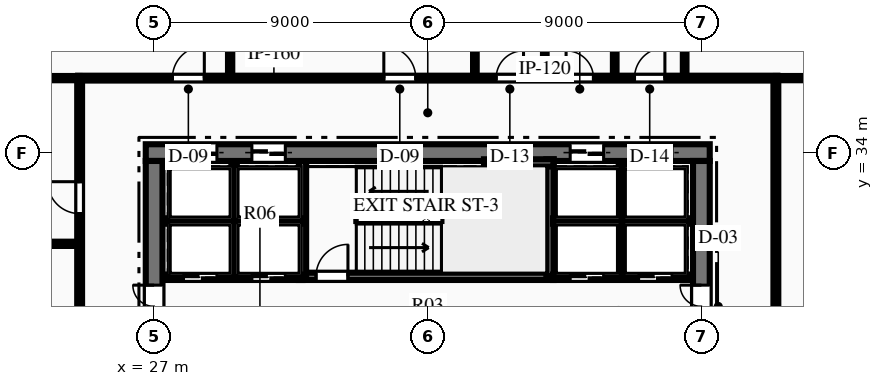
"""IFC4 building model, lengths in metres.
Left out: names, types, materials, properties, quantities, classifications, styles, units other than length and angle.
Written with IfcOpenShell. Run it as: python <this file> out.ifc"""

import sys

from ifc_helpers import new_model, si_unit, direction, frame, frame_2d, origin, place, context, subcontext, project, spatial, rectangle, extrude, element, fill, save


model = new_model("IFC4")
c1 = context("Model", 3, precision=1e-05, world=origin(), true_north=direction((0.0, 1.0)))
c2 = subcontext(c1, "Body", "Model", "MODEL_VIEW")
j1 = project(units=[si_unit("LENGTHUNIT", "METRE"), si_unit("PLANEANGLEUNIT", "RADIAN")], contexts=[c1])
p1 = place(None, origin())
s1 = spatial("IfcSite", under=j1, at=p1, CompositionType="ELEMENT")
p2 = place(p1, origin())
s2 = spatial("IfcBuilding", under=s1, at=p2, CompositionType="ELEMENT")
p3 = place(p2, frame((0.0, 0.0, 97.95)))
s3 = spatial("IfcBuildingStorey", under=s2, at=p3, CompositionType="ELEMENT", Elevation=97.95)
p4 = place(p3, frame((26.725, 34.0, 0.0), z_axis=(0.0, 0.0, 1.0), x_axis=(1.0, 0.0, 0.0)))
e1 = element("IfcWall", 1, at=p4, inside=s3, PredefinedType="SHEAR", context=c2, shape_type="SweptSolid", body=[
    extrude(rectangle(XDim=18.55, YDim=0.55, at=frame_2d((9.275, 0.0))), origin(), (0.0, 0.0, 1.0), 3.75),
])
p5 = place(p4, frame((1.24, 0.0, 0.0)))
e2 = element("IfcOpeningElement", 2, at=p5, cuts=e1, PredefinedType="OPENING", context=c2, shape_type="SweptSolid", body=[
    extrude(rectangle(XDim=1.1, YDim=2.15, at=frame_2d((0.55, 1.075))), frame((0.0, 0.285, 0.0), z_axis=(0.0, -1.0, 0.0), x_axis=(1.0, 0.0, 0.0)), (0.0, 0.0, 1.0), 0.57),
])
p6 = place(p4, frame((3.49, 0.0, 0.0)))
e3 = element("IfcOpeningElement", 3, at=p6, cuts=e1, PredefinedType="OPENING", context=c2, shape_type="SweptSolid", body=[
    extrude(rectangle(XDim=1.1, YDim=2.15, at=frame_2d((0.55, 1.075))), frame((0.0, 0.285, 0.0), z_axis=(0.0, -1.0, 0.0), x_axis=(1.0, 0.0, 0.0)), (0.0, 0.0, 1.0), 0.57),
])
p7 = place(p4, frame((13.96, 0.0, 0.0)))
e4 = element("IfcOpeningElement", 4, at=p7, cuts=e1, PredefinedType="OPENING", context=c2, shape_type="SweptSolid", body=[
    extrude(rectangle(XDim=1.1, YDim=2.15, at=frame_2d((0.55, 1.075))), frame((0.0, 0.285, 0.0), z_axis=(0.0, -1.0, 0.0), x_axis=(1.0, 0.0, 0.0)), (0.0, 0.0, 1.0), 0.57),
])
p8 = place(p4, frame((16.21, 0.0, 0.0)))
e5 = element("IfcOpeningElement", 5, at=p8, cuts=e1, PredefinedType="OPENING", context=c2, shape_type="SweptSolid", body=[
    extrude(rectangle(XDim=1.1, YDim=2.15, at=frame_2d((0.55, 1.075))), frame((0.0, 0.285, 0.0), z_axis=(0.0, -1.0, 0.0), x_axis=(1.0, 0.0, 0.0)), (0.0, 0.0, 1.0), 0.57),
])
p9 = place(p3, frame((27.0, 18.275, 0.0), z_axis=(0.0, 0.0, 1.0), x_axis=(0.0, 1.0, 0.0)))
e6 = element("IfcWall", 6, at=p9, inside=s3, PredefinedType="SHEAR", context=c2, shape_type="SweptSolid", body=[
    extrude(rectangle(XDim=15.45, YDim=0.55, at=frame_2d((7.725, 0.0))), origin(), (0.0, 0.0, 1.0), 3.75),
])
p10 = place(p9, frame((9.965, 0.0, 0.0)))
e7 = element("IfcOpeningElement", 7, at=p10, cuts=e6, PredefinedType="OPENING", context=c2, shape_type="SweptSolid", body=[
    extrude(rectangle(XDim=1.4, YDim=2.2, at=frame_2d((0.7, 1.1))), frame((0.0, 0.285, 0.0), z_axis=(0.0, -1.0, 0.0), x_axis=(1.0, 0.0, 0.0)), (0.0, 0.0, 1.0), 0.57),
])
p11 = place(p3, frame((45.0, 18.275, 0.0), z_axis=(0.0, 0.0, 1.0), x_axis=(0.0, 1.0, 0.0)))
e8 = element("IfcWall", 8, at=p11, inside=s3, PredefinedType="SHEAR", context=c2, shape_type="SweptSolid", body=[
    extrude(rectangle(XDim=15.45, YDim=0.55, at=frame_2d((7.725, 0.0))), origin(), (0.0, 0.0, 1.0), 3.75),
])
p12 = place(p11, frame((9.965, 0.0, 0.0)))
e9 = element("IfcOpeningElement", 9, at=p12, cuts=e8, PredefinedType="OPENING", context=c2, shape_type="SweptSolid", body=[
    extrude(rectangle(XDim=1.4, YDim=2.2, at=frame_2d((0.7, 1.1))), frame((0.0, 0.285, 0.0), z_axis=(0.0, -1.0, 0.0), x_axis=(1.0, 0.0, 0.0)), (0.0, 0.0, 1.0), 0.57),
])
p13 = place(p3, frame((31.76, 29.93, 0.0), z_axis=(0.0, 0.0, 1.0), x_axis=(1.0, 0.0, 0.0)))
e10 = element("IfcWall", 10, at=p13, inside=s3, PredefinedType="SHEAR", context=c2, shape_type="SweptSolid", body=[
    extrude(rectangle(XDim=8.38, YDim=0.24, at=frame_2d((4.19, 0.0))), origin(), (0.0, 0.0, 1.0), 3.75),
])
p14 = place(p13, frame((0.565, 0.0, 0.0)))
e11 = element("IfcOpeningElement", 11, at=p14, cuts=e10, PredefinedType="OPENING", context=c2, shape_type="SweptSolid", body=[
    extrude(rectangle(XDim=1.05, YDim=2.15, at=frame_2d((0.525, 1.075))), frame((0.0, 0.13, 0.0), z_axis=(0.0, -1.0, 0.0), x_axis=(1.0, 0.0, 0.0)), (0.0, 0.0, 1.0), 0.26),
])
p15 = place(p3, frame((31.88, 29.93, 0.0), z_axis=(0.0, 0.0, 1.0), x_axis=(0.0, 1.0, 0.0)))
e12 = element("IfcWall", 12, at=p15, inside=s3, PredefinedType="SHEAR", context=c2, shape_type="SweptSolid", body=[
    extrude(rectangle(XDim=3.79, YDim=0.24, at=frame_2d((1.895, 0.0))), origin(), (0.0, 0.0, 1.0), 3.75),
])
p16 = place(p3, frame((40.02, 29.93, 0.0), z_axis=(0.0, 0.0, 1.0), x_axis=(0.0, 1.0, 0.0)))
e13 = element("IfcWall", 13, at=p16, inside=s3, PredefinedType="SHEAR", context=c2, shape_type="SweptSolid", body=[
    extrude(rectangle(XDim=3.85, YDim=0.24, at=frame_2d((1.925, 0.0))), origin(), (0.0, 0.0, 1.0), 3.75),
])
p17 = place(p3, frame((37.85, 33.66, 0.0), z_axis=(0.0, 0.0, 1.0), x_axis=(1.0, 0.0, 0.0)))
e14 = element("IfcWall", 14, at=p17, inside=s3, PredefinedType="SHEAR", context=c2, shape_type="SweptSolid", body=[
    extrude(rectangle(XDim=2.29, YDim=0.24, at=frame_2d((1.145, 0.0))), origin(), (0.0, 0.0, 1.0), 3.75),
])
p18 = place(p3, frame((27.45, 29.9, 0.0), z_axis=(0.0, 0.0, 1.0), x_axis=(1.0, 0.0, 0.0)))
e15 = element("IfcWall", 15, at=p18, inside=s3, PredefinedType="PARTITIONING", context=c2, shape_type="SweptSolid", body=[
    extrude(rectangle(XDim=4.43, YDim=0.18, at=frame_2d((2.215, 0.0))), origin(), (0.0, 0.0, 1.0), 3.45),
])
p19 = place(p18, frame((0.515, 0.0, 0.0)))
e16 = element("IfcOpeningElement", 16, at=p19, cuts=e15, PredefinedType="OPENING", context=c2, shape_type="SweptSolid", body=[
    extrude(rectangle(XDim=1.1, YDim=2.15, at=frame_2d((0.55, 1.075))), frame((0.0, 0.1, 0.0), z_axis=(0.0, -1.0, 0.0), x_axis=(1.0, 0.0, 0.0)), (0.0, 0.0, 1.0), 0.2),
])
p20 = place(p18, frame((2.765, 0.0, 0.0)))
e17 = element("IfcOpeningElement", 17, at=p20, cuts=e15, PredefinedType="OPENING", context=c2, shape_type="SweptSolid", body=[
    extrude(rectangle(XDim=1.1, YDim=2.15, at=frame_2d((0.55, 1.075))), frame((0.0, 0.1, 0.0), z_axis=(0.0, -1.0, 0.0), x_axis=(1.0, 0.0, 0.0)), (0.0, 0.0, 1.0), 0.2),
])
p21 = place(p3, frame((27.45, 31.75, 0.0), z_axis=(0.0, 0.0, 1.0), x_axis=(1.0, 0.0, 0.0)))
e18 = element("IfcWall", 18, at=p21, inside=s3, PredefinedType="PARTITIONING", context=c2, shape_type="SweptSolid", body=[
    extrude(rectangle(XDim=4.43, YDim=0.18, at=frame_2d((2.215, 0.0))), origin(), (0.0, 0.0, 1.0), 3.45),
])
p22 = place(p3, frame((29.63, 29.9, 0.0), z_axis=(0.0, 0.0, 1.0), x_axis=(0.0, 1.0, 0.0)))
e19 = element("IfcWall", 19, at=p22, inside=s3, PredefinedType="PARTITIONING", context=c2, shape_type="SweptSolid", body=[
    extrude(rectangle(XDim=3.75, YDim=0.18, at=frame_2d((1.875, 0.0))), origin(), (0.0, 0.0, 1.0), 3.45),
])
p23 = place(p3, frame((40.12, 29.9, 0.0), z_axis=(0.0, 0.0, 1.0), x_axis=(1.0, 0.0, 0.0)))
e20 = element("IfcWall", 20, at=p23, inside=s3, PredefinedType="PARTITIONING", context=c2, shape_type="SweptSolid", body=[
    extrude(rectangle(XDim=4.43, YDim=0.18, at=frame_2d((2.215, 0.0))), origin(), (0.0, 0.0, 1.0), 3.45),
])
p24 = place(p23, frame((0.565, 0.0, 0.0)))
e21 = element("IfcOpeningElement", 21, at=p24, cuts=e20, PredefinedType="OPENING", context=c2, shape_type="SweptSolid", body=[
    extrude(rectangle(XDim=1.1, YDim=2.15, at=frame_2d((0.55, 1.075))), frame((0.0, 0.1, 0.0), z_axis=(0.0, -1.0, 0.0), x_axis=(1.0, 0.0, 0.0)), (0.0, 0.0, 1.0), 0.2),
])
p25 = place(p23, frame((2.815, 0.0, 0.0)))
e22 = element("IfcOpeningElement", 22, at=p25, cuts=e20, PredefinedType="OPENING", context=c2, shape_type="SweptSolid", body=[
    extrude(rectangle(XDim=1.1, YDim=2.15, at=frame_2d((0.55, 1.075))), frame((0.0, 0.1, 0.0), z_axis=(0.0, -1.0, 0.0), x_axis=(1.0, 0.0, 0.0)), (0.0, 0.0, 1.0), 0.2),
])
p26 = place(p3, frame((40.12, 31.75, 0.0), z_axis=(0.0, 0.0, 1.0), x_axis=(1.0, 0.0, 0.0)))
e23 = element("IfcWall", 23, at=p26, inside=s3, PredefinedType="PARTITIONING", context=c2, shape_type="SweptSolid", body=[
    extrude(rectangle(XDim=4.43, YDim=0.18, at=frame_2d((2.215, 0.0))), origin(), (0.0, 0.0, 1.0), 3.45),
])
p27 = place(p3, frame((42.37, 29.9, 0.0), z_axis=(0.0, 0.0, 1.0), x_axis=(0.0, 1.0, 0.0)))
e24 = element("IfcWall", 24, at=p27, inside=s3, PredefinedType="PARTITIONING", context=c2, shape_type="SweptSolid", body=[
    extrude(rectangle(XDim=3.75, YDim=0.18, at=frame_2d((1.875, 0.0))), origin(), (0.0, 0.0, 1.0), 3.45),
])
p28 = place(p3, frame((24.5, 36.45, 0.0), z_axis=(0.0, 0.0, 1.0), x_axis=(1.0, 0.0, 0.0)))
e25 = element("IfcWall", 25, at=p28, inside=s3, PredefinedType="PARTITIONING", context=c2, shape_type="SweptSolid", body=[
    extrude(rectangle(XDim=23.0, YDim=0.16, at=frame_2d((11.5, 0.0))), origin(), (0.0, 0.0, 1.0), 3.45),
])
p29 = place(p28, frame((13.75, 0.0, 0.0)))
e26 = element("IfcOpeningElement", 26, at=p29, cuts=e25, PredefinedType="OPENING", context=c2, shape_type="SweptSolid", body=[
    extrude(rectangle(XDim=0.9, YDim=2.15, at=frame_2d((0.45, 1.075))), frame((0.0, 0.09, 0.0), z_axis=(0.0, -1.0, 0.0), x_axis=(1.0, 0.0, 0.0)), (0.0, 0.0, 1.0), 0.18),
])
p30 = place(p28, frame((16.05, 0.0, 0.0)))
e27 = element("IfcOpeningElement", 27, at=p30, cuts=e25, PredefinedType="OPENING", context=c2, shape_type="SweptSolid", body=[
    extrude(rectangle(XDim=0.9, YDim=2.15, at=frame_2d((0.45, 1.075))), frame((0.0, 0.09, 0.0), z_axis=(0.0, -1.0, 0.0), x_axis=(1.0, 0.0, 0.0)), (0.0, 0.0, 1.0), 0.18),
])
p31 = place(p28, frame((18.3, 0.0, 0.0)))
e28 = element("IfcOpeningElement", 28, at=p31, cuts=e25, PredefinedType="OPENING", context=c2, shape_type="SweptSolid", body=[
    extrude(rectangle(XDim=1.0, YDim=2.15, at=frame_2d((0.5, 1.075))), frame((0.0, 0.09, 0.0), z_axis=(0.0, -1.0, 0.0), x_axis=(1.0, 0.0, 0.0)), (0.0, 0.0, 1.0), 0.18),
])
p32 = place(p28, frame((3.101, 0.0, 0.0)))
e29 = element("IfcOpeningElement", 29, at=p32, cuts=e25, PredefinedType="OPENING", context=c2, shape_type="SweptSolid", body=[
    extrude(rectangle(XDim=1.05, YDim=2.15, at=frame_2d((0.525, 1.075))), frame((0.0, 0.09, 0.0), z_axis=(0.0, -1.0, 0.0), x_axis=(1.0, 0.0, 0.0)), (0.0, 0.0, 1.0), 0.18),
])
p33 = place(p28, frame((10.055, 0.0, 0.0)))
e30 = element("IfcOpeningElement", 30, at=p33, cuts=e25, PredefinedType="OPENING", context=c2, shape_type="SweptSolid", body=[
    extrude(rectangle(XDim=1.05, YDim=2.15, at=frame_2d((0.525, 1.075))), frame((0.0, 0.09, 0.0), z_axis=(0.0, -1.0, 0.0), x_axis=(1.0, 0.0, 0.0)), (0.0, 0.0, 1.0), 0.18),
])
p34 = place(p3, frame((24.55, 15.55, 0.0), z_axis=(0.0, 0.0, 1.0), x_axis=(0.0, 1.0, 0.0)))
e31 = element("IfcWall", 31, at=p34, inside=s3, PredefinedType="PARTITIONING", context=c2, shape_type="SweptSolid", body=[
    extrude(rectangle(XDim=20.9, YDim=0.16, at=frame_2d((10.45, 0.0))), origin(), (0.0, 0.0, 1.0), 3.45),
])
p35 = place(p34, frame((5.107, 0.0, 0.0)))
e32 = element("IfcOpeningElement", 32, at=p35, cuts=e31, PredefinedType="OPENING", context=c2, shape_type="SweptSolid", body=[
    extrude(rectangle(XDim=1.05, YDim=2.15, at=frame_2d((0.525, 1.075))), frame((0.0, 0.09, 0.0), z_axis=(0.0, -1.0, 0.0), x_axis=(1.0, 0.0, 0.0)), (0.0, 0.0, 1.0), 0.18),
])
p36 = place(p34, frame((12.155, 0.0, 0.0)))
e33 = element("IfcOpeningElement", 33, at=p36, cuts=e31, PredefinedType="OPENING", context=c2, shape_type="SweptSolid", body=[
    extrude(rectangle(XDim=1.05, YDim=2.15, at=frame_2d((0.525, 1.075))), frame((0.0, 0.09, 0.0), z_axis=(0.0, -1.0, 0.0), x_axis=(1.0, 0.0, 0.0)), (0.0, 0.0, 1.0), 0.18),
])
p37 = place(p34, frame((16.443, 0.0, 0.0)))
e34 = element("IfcOpeningElement", 34, at=p37, cuts=e31, PredefinedType="OPENING", context=c2, shape_type="SweptSolid", body=[
    extrude(rectangle(XDim=1.05, YDim=2.15, at=frame_2d((0.525, 1.075))), frame((0.0, 0.09, 0.0), z_axis=(0.0, -1.0, 0.0), x_axis=(1.0, 0.0, 0.0)), (0.0, 0.0, 1.0), 0.18),
])
p38 = place(p3, frame((47.45, 15.55, 0.0), z_axis=(0.0, 0.0, 1.0), x_axis=(0.0, 1.0, 0.0)))
e35 = element("IfcWall", 35, at=p38, inside=s3, PredefinedType="PARTITIONING", context=c2, shape_type="SweptSolid", body=[
    extrude(rectangle(XDim=20.9, YDim=0.16, at=frame_2d((10.45, 0.0))), origin(), (0.0, 0.0, 1.0), 3.45),
])
p39 = place(p38, frame((7.417, 0.0, 0.0)))
e36 = element("IfcOpeningElement", 36, at=p39, cuts=e35, PredefinedType="OPENING", context=c2, shape_type="SweptSolid", body=[
    extrude(rectangle(XDim=1.05, YDim=2.15, at=frame_2d((0.525, 1.075))), frame((0.0, 0.09, 0.0), z_axis=(0.0, -1.0, 0.0), x_axis=(1.0, 0.0, 0.0)), (0.0, 0.0, 1.0), 0.18),
])
p40 = place(p3, frame((37.55, 36.45, 0.0), z_axis=(0.0, 0.0, 1.0), x_axis=(0.0, 1.0, 0.0)))
e37 = element("IfcWall", 37, at=p40, inside=s3, PredefinedType="PARTITIONING", context=c2, shape_type="SweptSolid", body=[
    extrude(rectangle(XDim=3.9, YDim=0.12, at=frame_2d((1.95, 0.0))), origin(), (0.0, 0.0, 1.0), 3.45),
])
p41 = place(p3, frame((39.85, 36.45, 0.0), z_axis=(0.0, 0.0, 1.0), x_axis=(0.0, 1.0, 0.0)))
e38 = element("IfcWall", 38, at=p41, inside=s3, PredefinedType="PARTITIONING", context=c2, shape_type="SweptSolid", body=[
    extrude(rectangle(XDim=3.9, YDim=0.12, at=frame_2d((1.95, 0.0))), origin(), (0.0, 0.0, 1.0), 2.749),
])
for number, where, z_axis, x_axis in (
    (39, (42.15, 36.45, 0.0), (0.0, 0.0, 1.0), (0.0, 1.0, 0.0)),
    (40, (44.45, 36.45, 0.0), (0.0, 0.0, 1.0), (0.0, 1.0, 0.0)),
):
    element("IfcWall", number, at=place(p3, frame(where, z_axis=z_axis, x_axis=x_axis)), inside=s3, PredefinedType="PARTITIONING", context=c2, shape_type="SweptSolid", body=[
        extrude(rectangle(XDim=3.9, YDim=0.12, at=frame_2d((1.95, 0.0))), origin(), (0.0, 0.0, 1.0), 3.45),
    ])
p42 = place(p3, frame((4.924, 36.45, 0.0), z_axis=(0.0, 0.0, 1.0), x_axis=(1.0, 0.0, 0.0)))
e41 = element("IfcWall", 41, at=p42, inside=s3, PredefinedType="PARTITIONING", context=c2, shape_type="SweptSolid", body=[
    extrude(rectangle(XDim=19.626, YDim=0.14, at=frame_2d((9.813, 0.0))), origin(), (0.0, 0.0, 1.0), 3.45),
])
p43 = place(p3, frame((47.45, 36.45, 0.0), z_axis=(0.0, 0.0, 1.0), x_axis=(1.0, 0.0, 0.0)))
e42 = element("IfcWall", 42, at=p43, inside=s3, PredefinedType="PARTITIONING", context=c2, shape_type="SweptSolid", body=[
    extrude(rectangle(XDim=12.46, YDim=0.14, at=frame_2d((6.23, 0.0))), origin(), (0.0, 0.0, 1.0), 3.45),
])
p44 = place(p3, frame((29.5, 36.45, 0.0), z_axis=(0.0, 0.0, 1.0), x_axis=(0.0, 1.0, 0.0)))
e43 = element("IfcWall", 43, at=p44, inside=s3, PredefinedType="PARTITIONING", context=c2, shape_type="SweptSolid", body=[
    extrude(rectangle(XDim=13.669, YDim=0.14, at=frame_2d((6.835, 0.0))), origin(), (0.0, 0.0, 1.0), 3.45),
])
p45 = place(p3, frame((6.252, 31.0, 0.0), z_axis=(0.0, 0.0, 1.0), x_axis=(1.0, 0.0, 0.0)))
e44 = element("IfcWall", 44, at=p45, inside=s3, PredefinedType="PARTITIONING", context=c2, shape_type="SweptSolid", body=[
    extrude(rectangle(XDim=18.298, YDim=0.14, at=frame_2d((9.149, 0.0))), origin(), (0.0, 0.0, 1.0), 3.45),
])
p46 = place(p14, origin())
e45 = element("IfcDoor", 45, at=p46, inside=s3, OperationType="SINGLE_SWING_RIGHT", PredefinedType="DOOR", context=c2, shape_type="SweptSolid", body=[
    extrude(rectangle(XDim=1.05, YDim=2.15, at=frame_2d((0.525, 1.075))), frame((0.0, 0.025, 0.0), z_axis=(0.0, -1.0, 0.0), x_axis=(1.0, 0.0, 0.0)), (0.0, 0.0, 1.0), 0.05),
])
fill(e11, e45)
p47 = place(p10, origin())
e46 = element("IfcDoor", 46, at=p47, inside=s3, OperationType="DOUBLE_DOOR_SINGLE_SWING", PredefinedType="DOOR", context=c2, shape_type="SweptSolid", body=[
    extrude(rectangle(XDim=1.4, YDim=2.2, at=frame_2d((0.7, 1.1))), frame((0.0, 0.025, 0.0), z_axis=(0.0, -1.0, 0.0), x_axis=(1.0, 0.0, 0.0)), (0.0, 0.0, 1.0), 0.05),
])
fill(e7, e46)
p48 = place(p12, origin())
e47 = element("IfcDoor", 47, at=p48, inside=s3, OperationType="DOUBLE_DOOR_SINGLE_SWING", PredefinedType="DOOR", context=c2, shape_type="SweptSolid", body=[
    extrude(rectangle(XDim=1.4, YDim=2.2, at=frame_2d((0.7, 1.1))), frame((0.0, 0.025, 0.0), z_axis=(0.0, -1.0, 0.0), x_axis=(1.0, 0.0, 0.0)), (0.0, 0.0, 1.0), 0.05),
])
fill(e9, e47)
p49 = place(p29, origin())
e48 = element("IfcDoor", 48, at=p49, inside=s3, OperationType="SINGLE_SWING_RIGHT", PredefinedType="DOOR", context=c2, shape_type="SweptSolid", body=[
    extrude(rectangle(XDim=0.9, YDim=2.15, at=frame_2d((0.45, 1.075))), frame((0.0, 0.025, 0.0), z_axis=(0.0, -1.0, 0.0), x_axis=(1.0, 0.0, 0.0)), (0.0, 0.0, 1.0), 0.05),
])
fill(e26, e48)
p50 = place(p30, origin())
e49 = element("IfcDoor", 49, at=p50, inside=s3, OperationType="SINGLE_SWING_LEFT", PredefinedType="DOOR", context=c2, shape_type="SweptSolid", body=[
    extrude(rectangle(XDim=0.9, YDim=2.15, at=frame_2d((0.45, 1.075))), frame((0.0, 0.025, 0.0), z_axis=(0.0, -1.0, 0.0), x_axis=(1.0, 0.0, 0.0)), (0.0, 0.0, 1.0), 0.05),
])
fill(e27, e49)
p51 = place(p31, origin())
e50 = element("IfcDoor", 50, at=p51, inside=s3, OperationType="SINGLE_SWING_RIGHT", PredefinedType="DOOR", context=c2, shape_type="SweptSolid", body=[
    extrude(rectangle(XDim=1.0, YDim=2.15, at=frame_2d((0.5, 1.075))), frame((0.0, 0.025, 0.0), z_axis=(0.0, -1.0, 0.0), x_axis=(1.0, 0.0, 0.0)), (0.0, 0.0, 1.0), 0.05),
])
fill(e28, e50)
p52 = place(p32, origin())
e51 = element("IfcDoor", 51, at=p52, inside=s3, OperationType="SINGLE_SWING_RIGHT", PredefinedType="DOOR", context=c2, shape_type="SweptSolid", body=[
    extrude(rectangle(XDim=1.05, YDim=2.15, at=frame_2d((0.525, 1.075))), frame((0.0, 0.025, 0.0), z_axis=(0.0, -1.0, 0.0), x_axis=(1.0, 0.0, 0.0)), (0.0, 0.0, 1.0), 0.05),
])
fill(e29, e51)
p53 = place(p33, origin())
e52 = element("IfcDoor", 52, at=p53, inside=s3, OperationType="SINGLE_SWING_LEFT", PredefinedType="DOOR", context=c2, shape_type="SweptSolid", body=[
    extrude(rectangle(XDim=1.05, YDim=2.15, at=frame_2d((0.525, 1.075))), frame((0.0, 0.025, 0.0), z_axis=(0.0, -1.0, 0.0), x_axis=(1.0, 0.0, 0.0)), (0.0, 0.0, 1.0), 0.05),
])
fill(e30, e52)
p54 = place(p37, origin())
e53 = element("IfcDoor", 53, at=p54, inside=s3, OperationType="SINGLE_SWING_RIGHT", PredefinedType="DOOR", context=c2, shape_type="SweptSolid", body=[
    extrude(rectangle(XDim=1.05, YDim=2.15, at=frame_2d((0.525, 1.075))), frame((0.0, 0.025, 0.0), z_axis=(0.0, -1.0, 0.0), x_axis=(1.0, 0.0, 0.0)), (0.0, 0.0, 1.0), 0.05),
])
fill(e34, e53)
p55 = place(p19, origin())
e54 = element("IfcDoor", 54, at=p55, inside=s3, OperationType="SLIDING_TO_LEFT", PredefinedType="DOOR", context=c2, shape_type="SweptSolid", body=[
    extrude(rectangle(XDim=1.1, YDim=2.15, at=frame_2d((0.55, 1.075))), frame((0.0, 0.025, 0.0), z_axis=(0.0, -1.0, 0.0), x_axis=(1.0, 0.0, 0.0)), (0.0, 0.0, 1.0), 0.05),
])
fill(e16, e54)
p56 = place(p20, origin())
e55 = element("IfcDoor", 55, at=p56, inside=s3, OperationType="SLIDING_TO_LEFT", PredefinedType="DOOR", context=c2, shape_type="SweptSolid", body=[
    extrude(rectangle(XDim=1.1, YDim=2.15, at=frame_2d((0.55, 1.075))), frame((0.0, 0.025, 0.0), z_axis=(0.0, -1.0, 0.0), x_axis=(1.0, 0.0, 0.0)), (0.0, 0.0, 1.0), 0.05),
])
fill(e17, e55)
p57 = place(p5, origin())
e56 = element("IfcDoor", 56, at=p57, inside=s3, OperationType="SLIDING_TO_LEFT", PredefinedType="DOOR", context=c2, shape_type="SweptSolid", body=[
    extrude(rectangle(XDim=1.1, YDim=2.15, at=frame_2d((0.55, 1.075))), frame((0.0, 0.025, 0.0), z_axis=(0.0, -1.0, 0.0), x_axis=(1.0, 0.0, 0.0)), (0.0, 0.0, 1.0), 0.05),
])
fill(e2, e56)
p58 = place(p6, origin())
e57 = element("IfcDoor", 57, at=p58, inside=s3, OperationType="SLIDING_TO_LEFT", PredefinedType="DOOR", context=c2, shape_type="SweptSolid", body=[
    extrude(rectangle(XDim=1.1, YDim=2.15, at=frame_2d((0.55, 1.075))), frame((0.0, 0.025, 0.0), z_axis=(0.0, -1.0, 0.0), x_axis=(1.0, 0.0, 0.0)), (0.0, 0.0, 1.0), 0.05),
])
fill(e3, e57)
p59 = place(p24, origin())
e58 = element("IfcDoor", 58, at=p59, inside=s3, OperationType="SLIDING_TO_LEFT", PredefinedType="DOOR", context=c2, shape_type="SweptSolid", body=[
    extrude(rectangle(XDim=1.1, YDim=2.15, at=frame_2d((0.55, 1.075))), frame((0.0, 0.025, 0.0), z_axis=(0.0, -1.0, 0.0), x_axis=(1.0, 0.0, 0.0)), (0.0, 0.0, 1.0), 0.05),
])
fill(e21, e58)
p60 = place(p25, origin())
e59 = element("IfcDoor", 59, at=p60, inside=s3, OperationType="SLIDING_TO_LEFT", PredefinedType="DOOR", context=c2, shape_type="SweptSolid", body=[
    extrude(rectangle(XDim=1.1, YDim=2.15, at=frame_2d((0.55, 1.075))), frame((0.0, 0.025, 0.0), z_axis=(0.0, -1.0, 0.0), x_axis=(1.0, 0.0, 0.0)), (0.0, 0.0, 1.0), 0.05),
])
fill(e22, e59)
p61 = place(p7, origin())
e60 = element("IfcDoor", 60, at=p61, inside=s3, OperationType="SLIDING_TO_LEFT", PredefinedType="DOOR", context=c2, shape_type="SweptSolid", body=[
    extrude(rectangle(XDim=1.1, YDim=2.15, at=frame_2d((0.55, 1.075))), frame((0.0, 0.025, 0.0), z_axis=(0.0, -1.0, 0.0), x_axis=(1.0, 0.0, 0.0)), (0.0, 0.0, 1.0), 0.05),
])
fill(e4, e60)
p62 = place(p8, origin())
e61 = element("IfcDoor", 61, at=p62, inside=s3, OperationType="SLIDING_TO_LEFT", PredefinedType="DOOR", context=c2, shape_type="SweptSolid", body=[
    extrude(rectangle(XDim=1.1, YDim=2.15, at=frame_2d((0.55, 1.075))), frame((0.0, 0.025, 0.0), z_axis=(0.0, -1.0, 0.0), x_axis=(1.0, 0.0, 0.0)), (0.0, 0.0, 1.0), 0.05),
])
fill(e5, e61)
save(model, sys.argv[1])
